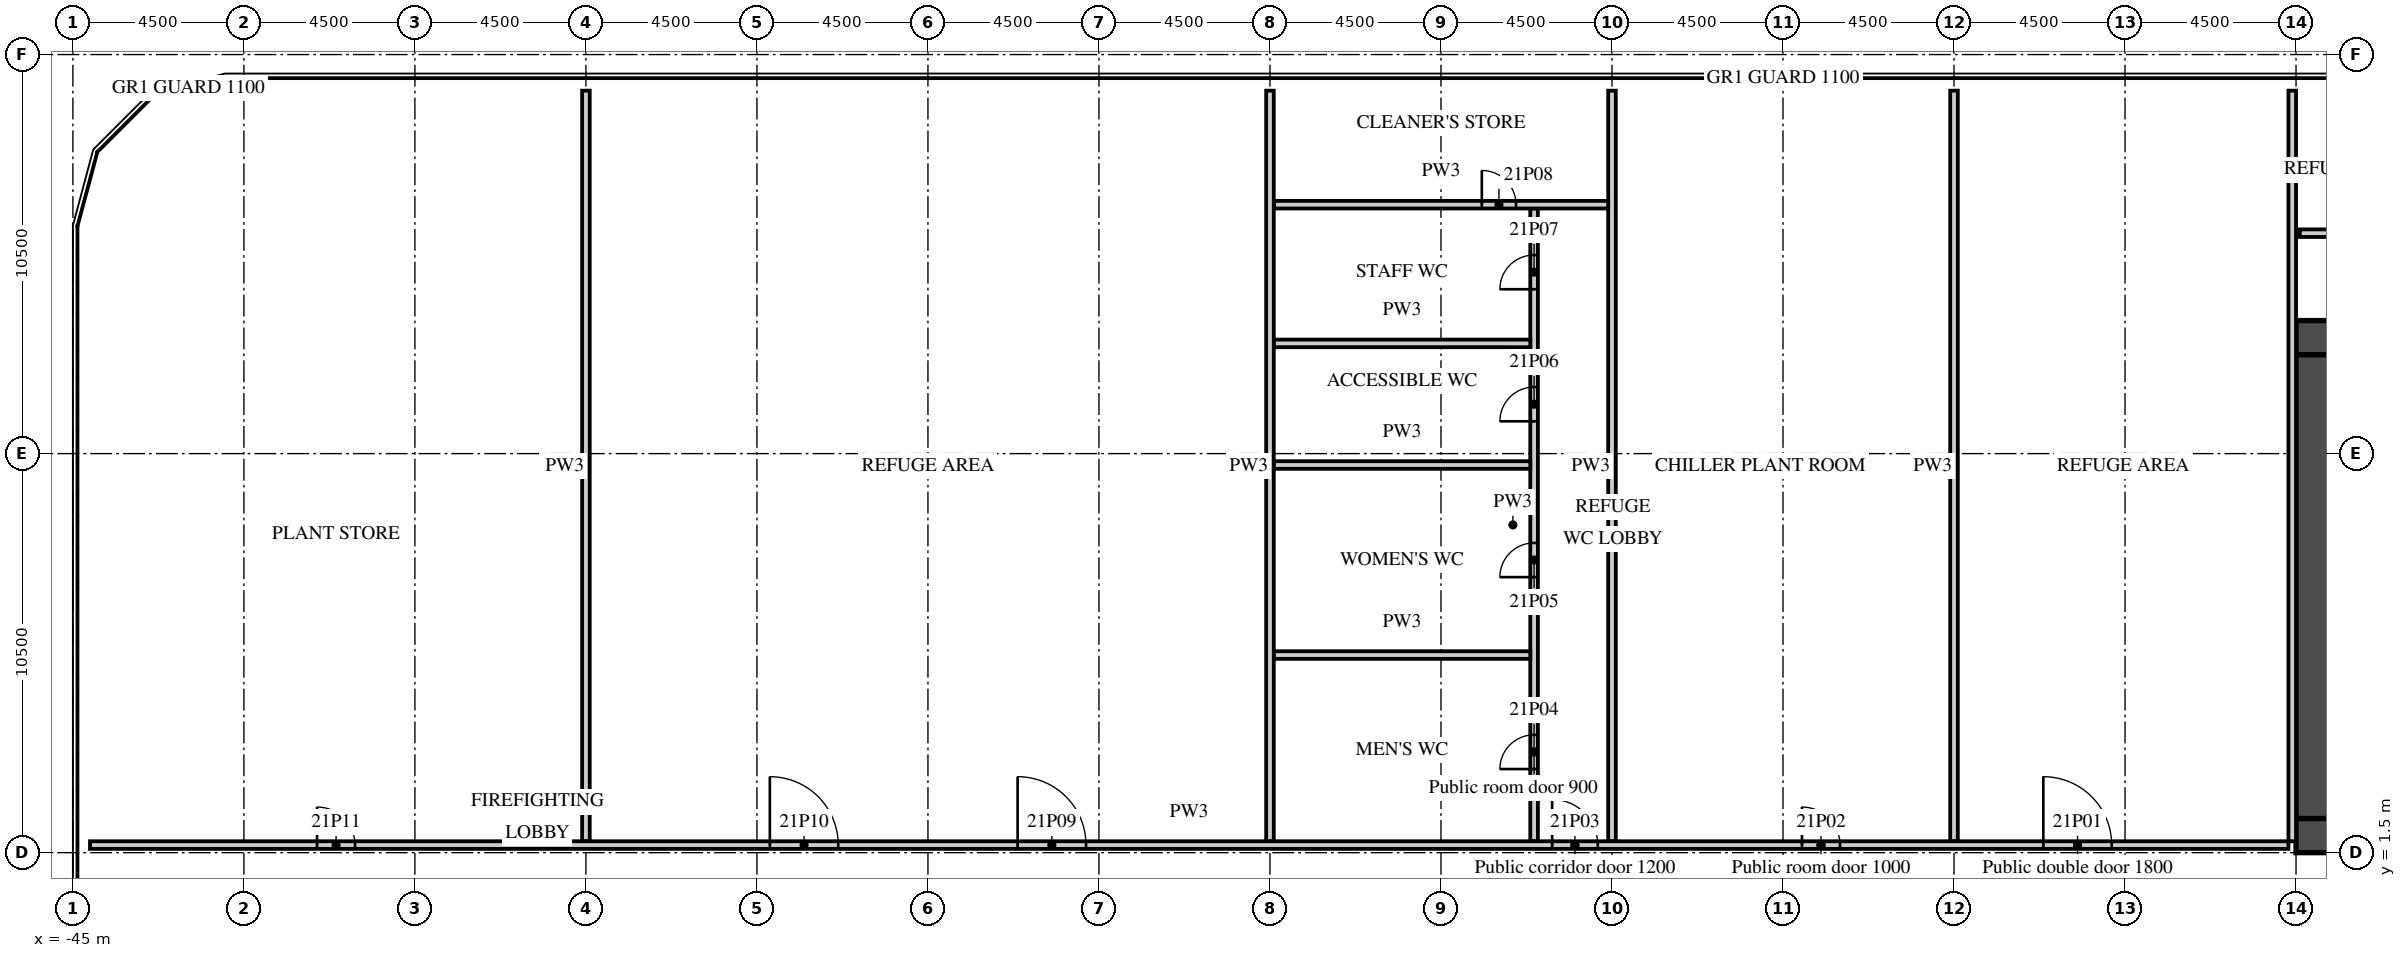
"""IFC4 building model, lengths in metres.
Left out: names, types, materials, properties, quantities, classifications, styles, units other than length and angle.
Written with IfcOpenShell. Run it as: python <this file> out.ifc"""

import sys

from ifc_helpers import new_model, si_unit, direction, frame, frame_2d, origin, place, context, subcontext, project, spatial, rectangle, extrude, element, fill, save


model = new_model("IFC4")
c1 = context("Model", 3, precision=1e-05, world=origin(), true_north=direction((0.0, 1.0)))
c2 = subcontext(c1, "Body", "Model", "MODEL_VIEW")
j1 = project(units=[si_unit("LENGTHUNIT", "METRE"), si_unit("PLANEANGLEUNIT", "RADIAN")], contexts=[c1])
p1 = place(None, origin())
s1 = spatial("IfcSite", under=j1, at=p1, CompositionType="ELEMENT")
p2 = place(p1, origin())
s2 = spatial("IfcBuilding", under=s1, at=p2, CompositionType="ELEMENT")
p3 = place(p2, frame((0.0, 0.0, 99.6)))
s3 = spatial("IfcBuildingStorey", under=s2, at=p3, CompositionType="ELEMENT", Elevation=99.6)
p4 = place(p3, frame((13.5, 1.95, 0.0), z_axis=(0.0, 0.0, 1.0), x_axis=(1.0, 0.0, 0.0)))
e1 = element("IfcWall", 1, at=p4, inside=s3, PredefinedType="SHEAR", context=c2, shape_type="SweptSolid", body=[
    extrude(rectangle(XDim=18.0, YDim=0.9, at=frame_2d((9.0, 0.0))), origin(), (0.0, 0.0, 1.0), 4.2),
])
p5 = place(p4, frame((1.475, 0.0, 0.0)))
e2 = element("IfcOpeningElement", 2, at=p5, cuts=e1, PredefinedType="OPENING", context=c2, shape_type="SweptSolid", body=[
    extrude(rectangle(XDim=1.8, YDim=2.1, at=frame_2d((0.9, 1.05))), frame((0.0, 0.46, 0.0), z_axis=(0.0, -1.0, 0.0), x_axis=(1.0, 0.0, 0.0)), (0.0, 0.0, 1.0), 0.92),
])
p6 = place(p3, frame((13.5, 15.05, 0.0), z_axis=(0.0, 0.0, 1.0), x_axis=(1.0, 0.0, 0.0)))
e3 = element("IfcWall", 3, at=p6, inside=s3, PredefinedType="SHEAR", context=c2, shape_type="SweptSolid", body=[
    extrude(rectangle(XDim=6.8, YDim=0.9, at=frame_2d((3.4, 0.0))), origin(), (0.0, 0.0, 1.0), 4.2),
])
p7 = place(p6, frame((4.725, 0.0, 0.0)))
e4 = element("IfcOpeningElement", 4, at=p7, cuts=e3, PredefinedType="OPENING", context=c2, shape_type="SweptSolid", body=[
    extrude(rectangle(XDim=1.2, YDim=2.1, at=frame_2d((0.6, 1.05))), frame((0.0, 0.46, 0.0), z_axis=(0.0, -1.0, 0.0), x_axis=(1.0, 0.0, 0.0)), (0.0, 0.0, 1.0), 0.92),
])
p8 = place(p3, frame((13.95, 2.4, 0.0), z_axis=(0.0, 0.0, 1.0), x_axis=(0.0, 1.0, 0.0)))
e5 = element("IfcWall", 5, at=p8, inside=s3, PredefinedType="SHEAR", context=c2, shape_type="SweptSolid", body=[
    extrude(rectangle(XDim=12.2, YDim=0.9, at=frame_2d((6.1, 0.0))), origin(), (0.0, 0.0, 1.0), 4.2),
])
p9 = place(p3, frame((13.6, 17.8, 0.0), z_axis=(0.0, 0.0, 1.0), x_axis=(1.0, 0.0, 0.0)))
e6 = element("IfcWall", 6, at=p9, inside=s3, PredefinedType="PARTITIONING", context=c2, shape_type="SweptSolid", body=[
    extrude(rectangle(XDim=30.95, YDim=0.2, at=frame_2d((15.475, 0.0))), origin(), (0.0, 0.0, 1.0), 4.2),
])
p10 = place(p9, frame((16.613, 0.0, 0.0)))
e7 = element("IfcOpeningElement", 7, at=p10, cuts=e6, PredefinedType="OPENING", context=c2, shape_type="SweptSolid", body=[
    extrude(rectangle(XDim=0.9, YDim=2.1, at=frame_2d((0.45, 1.05))), frame((0.0, 0.11, 0.0), z_axis=(0.0, -1.0, 0.0), x_axis=(1.0, 0.0, 0.0)), (0.0, 0.0, 1.0), 0.22),
])
p11 = place(p9, frame((8.312, 0.0, 0.0)))
e8 = element("IfcOpeningElement", 8, at=p11, cuts=e6, PredefinedType="OPENING", context=c2, shape_type="SweptSolid", body=[
    extrude(rectangle(XDim=0.9, YDim=2.1, at=frame_2d((0.45, 1.05))), frame((0.0, 0.11, 0.0), z_axis=(0.0, -1.0, 0.0), x_axis=(1.0, 0.0, 0.0)), (0.0, 0.0, 1.0), 0.22),
])
for number, where, z_axis, x_axis in (
    (9, (4.5, 1.8, 0.0), (0.0, 0.0, 1.0), (0.0, 1.0, 0.0)),
    (10, (-4.5, 1.8, 0.0), (0.0, 0.0, 1.0), (0.0, 1.0, 0.0)),
):
    element("IfcWall", number, at=place(p3, frame(where, z_axis=z_axis, x_axis=x_axis)), inside=s3, PredefinedType="PARTITIONING", context=c2, shape_type="SweptSolid", body=[
        extrude(rectangle(XDim=19.75, YDim=0.2, at=frame_2d((9.875, 0.0))), origin(), (0.0, 0.0, 1.0), 4.2),
    ])
p12 = place(p3, frame((-6.55, 1.8, 0.0), z_axis=(0.0, 0.0, 1.0), x_axis=(0.0, 1.0, 0.0)))
e11 = element("IfcWall", 11, at=p12, inside=s3, PredefinedType="PARTITIONING", context=c2, shape_type="SweptSolid", body=[
    extrude(rectangle(XDim=16.65, YDim=0.2, at=frame_2d((8.325, 0.0))), origin(), (0.0, 0.0, 1.0), 4.2),
])
p13 = place(p12, frame((1.9, 0.0, 0.0)))
e12 = element("IfcOpeningElement", 12, at=p13, cuts=e11, PredefinedType="OPENING", context=c2, shape_type="SweptSolid", body=[
    extrude(rectangle(XDim=0.9, YDim=2.1, at=frame_2d((0.45, 1.05))), frame((0.0, 0.11, 0.0), z_axis=(0.0, -1.0, 0.0), x_axis=(1.0, 0.0, 0.0)), (0.0, 0.0, 1.0), 0.22),
])
p14 = place(p12, frame((6.95, 0.0, 0.0)))
e13 = element("IfcOpeningElement", 13, at=p14, cuts=e11, PredefinedType="OPENING", context=c2, shape_type="SweptSolid", body=[
    extrude(rectangle(XDim=0.9, YDim=2.1, at=frame_2d((0.45, 1.05))), frame((0.0, 0.11, 0.0), z_axis=(0.0, -1.0, 0.0), x_axis=(1.0, 0.0, 0.0)), (0.0, 0.0, 1.0), 0.22),
])
p15 = place(p12, frame((11.05, 0.0, 0.0)))
e14 = element("IfcOpeningElement", 14, at=p15, cuts=e11, PredefinedType="OPENING", context=c2, shape_type="SweptSolid", body=[
    extrude(rectangle(XDim=0.9, YDim=2.1, at=frame_2d((0.45, 1.05))), frame((0.0, 0.11, 0.0), z_axis=(0.0, -1.0, 0.0), x_axis=(1.0, 0.0, 0.0)), (0.0, 0.0, 1.0), 0.22),
])
p16 = place(p12, frame((14.525, 0.0, 0.0)))
e15 = element("IfcOpeningElement", 15, at=p16, cuts=e11, PredefinedType="OPENING", context=c2, shape_type="SweptSolid", body=[
    extrude(rectangle(XDim=0.9, YDim=2.1, at=frame_2d((0.45, 1.05))), frame((0.0, 0.11, 0.0), z_axis=(0.0, -1.0, 0.0), x_axis=(1.0, 0.0, 0.0)), (0.0, 0.0, 1.0), 0.22),
])
for number, where, z_axis, x_axis in (
    (16, (-13.4, 6.7, 0.0), (0.0, 0.0, 1.0), (1.0, 0.0, 0.0)),
    (17, (-13.4, 11.7, 0.0), (0.0, 0.0, 1.0), (1.0, 0.0, 0.0)),
    (18, (-13.4, 14.9, 0.0), (0.0, 0.0, 1.0), (1.0, 0.0, 0.0)),
):
    element("IfcWall", number, at=place(p3, frame(where, z_axis=z_axis, x_axis=x_axis)), inside=s3, PredefinedType="PARTITIONING", context=c2, shape_type="SweptSolid", body=[
        extrude(rectangle(XDim=6.75, YDim=0.2, at=frame_2d((3.375, 0.0))), origin(), (0.0, 0.0, 1.0), 4.2),
    ])
p17 = place(p3, frame((-13.4, 18.55, 0.0), z_axis=(0.0, 0.0, 1.0), x_axis=(1.0, 0.0, 0.0)))
e19 = element("IfcWall", 19, at=p17, inside=s3, PredefinedType="PARTITIONING", context=c2, shape_type="SweptSolid", body=[
    extrude(rectangle(XDim=8.8, YDim=0.2, at=frame_2d((4.4, 0.0))), origin(), (0.0, 0.0, 1.0), 4.2),
])
p18 = place(p17, frame((5.475, 0.0, 0.0)))
e20 = element("IfcOpeningElement", 20, at=p18, cuts=e19, PredefinedType="OPENING", context=c2, shape_type="SweptSolid", body=[
    extrude(rectangle(XDim=0.9, YDim=2.1, at=frame_2d((0.45, 1.05))), frame((0.0, 0.11, 0.0), z_axis=(0.0, -1.0, 0.0), x_axis=(1.0, 0.0, 0.0)), (0.0, 0.0, 1.0), 0.22),
])
for number, where, z_axis, x_axis in (
    (21, (-13.5, 1.8, 0.0), (0.0, 0.0, 1.0), (0.0, 1.0, 0.0)),
    (22, (-31.5, 1.8, 0.0), (0.0, 0.0, 1.0), (0.0, 1.0, 0.0)),
):
    element("IfcWall", number, at=place(p3, frame(where, z_axis=z_axis, x_axis=x_axis)), inside=s3, PredefinedType="PARTITIONING", context=c2, shape_type="SweptSolid", body=[
        extrude(rectangle(XDim=19.75, YDim=0.2, at=frame_2d((9.875, 0.0))), origin(), (0.0, 0.0, 1.0), 4.2),
    ])
p19 = place(p3, frame((-44.55, 1.7, 0.0), z_axis=(0.0, 0.0, 1.0), x_axis=(1.0, 0.0, 0.0)))
e23 = element("IfcWall", 23, at=p19, inside=s3, PredefinedType="PARTITIONING", context=c2, shape_type="SweptSolid", body=[
    extrude(rectangle(XDim=57.85, YDim=0.2, at=frame_2d((28.925, 0.0))), origin(), (0.0, 0.0, 1.0), 4.2),
])
p20 = place(p19, frame((51.4, 0.0, 0.0)))
e24 = element("IfcOpeningElement", 24, at=p20, cuts=e23, PredefinedType="OPENING", context=c2, shape_type="SweptSolid", body=[
    extrude(rectangle(XDim=1.8, YDim=2.1, at=frame_2d((0.9, 1.05))), frame((0.0, 0.11, 0.0), z_axis=(0.0, -1.0, 0.0), x_axis=(1.0, 0.0, 0.0)), (0.0, 0.0, 1.0), 0.22),
])
p21 = place(p19, frame((45.05, 0.0, 0.0)))
e25 = element("IfcOpeningElement", 25, at=p21, cuts=e23, PredefinedType="OPENING", context=c2, shape_type="SweptSolid", body=[
    extrude(rectangle(XDim=1.0, YDim=2.1, at=frame_2d((0.5, 1.05))), frame((0.0, 0.11, 0.0), z_axis=(0.0, -1.0, 0.0), x_axis=(1.0, 0.0, 0.0)), (0.0, 0.0, 1.0), 0.22),
])
p22 = place(p19, frame((38.475, 0.0, 0.0)))
e26 = element("IfcOpeningElement", 26, at=p22, cuts=e23, PredefinedType="OPENING", context=c2, shape_type="SweptSolid", body=[
    extrude(rectangle(XDim=1.2, YDim=2.1, at=frame_2d((0.6, 1.05))), frame((0.0, 0.11, 0.0), z_axis=(0.0, -1.0, 0.0), x_axis=(1.0, 0.0, 0.0)), (0.0, 0.0, 1.0), 0.22),
])
p23 = place(p19, frame((24.41, 0.0, 0.0)))
e27 = element("IfcOpeningElement", 27, at=p23, cuts=e23, PredefinedType="OPENING", context=c2, shape_type="SweptSolid", body=[
    extrude(rectangle(XDim=1.8, YDim=2.1, at=frame_2d((0.9, 1.05))), frame((0.0, 0.11, 0.0), z_axis=(0.0, -1.0, 0.0), x_axis=(1.0, 0.0, 0.0)), (0.0, 0.0, 1.0), 0.22),
])
p24 = place(p19, frame((17.89, 0.0, 0.0)))
e28 = element("IfcOpeningElement", 28, at=p24, cuts=e23, PredefinedType="OPENING", context=c2, shape_type="SweptSolid", body=[
    extrude(rectangle(XDim=1.8, YDim=2.1, at=frame_2d((0.9, 1.05))), frame((0.0, 0.11, 0.0), z_axis=(0.0, -1.0, 0.0), x_axis=(1.0, 0.0, 0.0)), (0.0, 0.0, 1.0), 0.22),
])
p25 = place(p19, frame((5.975, 0.0, 0.0)))
e29 = element("IfcOpeningElement", 29, at=p25, cuts=e23, PredefinedType="OPENING", context=c2, shape_type="SweptSolid", body=[
    extrude(rectangle(XDim=1.0, YDim=2.1, at=frame_2d((0.5, 1.05))), frame((0.0, 0.11, 0.0), z_axis=(0.0, -1.0, 0.0), x_axis=(1.0, 0.0, 0.0)), (0.0, 0.0, 1.0), 0.22),
])
p26 = place(p3, frame((13.4, 1.8, 0.0), z_axis=(0.0, 0.0, 1.0), x_axis=(0.0, 1.0, 0.0)))
e30 = element("IfcWall", 30, at=p26, inside=s3, PredefinedType="PARTITIONING", context=c2, shape_type="SweptSolid", body=[
    extrude(rectangle(XDim=19.75, YDim=0.2, at=frame_2d((9.875, 0.0))), origin(), (0.0, 0.0, 1.0), 4.2),
])
p27 = place(p20, origin())
e31 = element("IfcDoor", 31, at=p27, inside=s3, OperationType="DOUBLE_DOOR_DOUBLE_SWING", PredefinedType="DOOR", context=c2, shape_type="SweptSolid", body=[
    extrude(rectangle(XDim=1.8, YDim=2.1, at=frame_2d((0.9, 1.05))), frame((0.0, 0.025, 0.0), z_axis=(0.0, -1.0, 0.0), x_axis=(1.0, 0.0, 0.0)), (0.0, 0.0, 1.0), 0.05),
])
fill(e24, e31)
p28 = place(p21, origin())
e32 = element("IfcDoor", 32, at=p28, inside=s3, OperationType="SINGLE_SWING_LEFT", PredefinedType="DOOR", context=c2, shape_type="SweptSolid", body=[
    extrude(rectangle(XDim=1.0, YDim=2.1, at=frame_2d((0.5, 1.05))), frame((0.0, 0.025, 0.0), z_axis=(0.0, -1.0, 0.0), x_axis=(1.0, 0.0, 0.0)), (0.0, 0.0, 1.0), 0.05),
])
fill(e25, e32)
p29 = place(p22, origin())
e33 = element("IfcDoor", 33, at=p29, inside=s3, OperationType="SINGLE_SWING_LEFT", PredefinedType="DOOR", context=c2, shape_type="SweptSolid", body=[
    extrude(rectangle(XDim=1.2, YDim=2.1, at=frame_2d((0.6, 1.05))), frame((0.0, 0.025, 0.0), z_axis=(0.0, -1.0, 0.0), x_axis=(1.0, 0.0, 0.0)), (0.0, 0.0, 1.0), 0.05),
])
fill(e26, e33)
p30 = place(p13, origin())
e34 = element("IfcDoor", 34, at=p30, inside=s3, OperationType="SINGLE_SWING_LEFT", PredefinedType="DOOR", context=c2, shape_type="SweptSolid", body=[
    extrude(rectangle(XDim=0.9, YDim=2.1, at=frame_2d((0.45, 1.05))), frame((0.0, 0.025, 0.0), z_axis=(0.0, -1.0, 0.0), x_axis=(1.0, 0.0, 0.0)), (0.0, 0.0, 1.0), 0.05),
])
fill(e12, e34)
p31 = place(p14, origin())
e35 = element("IfcDoor", 35, at=p31, inside=s3, OperationType="SINGLE_SWING_LEFT", PredefinedType="DOOR", context=c2, shape_type="SweptSolid", body=[
    extrude(rectangle(XDim=0.9, YDim=2.1, at=frame_2d((0.45, 1.05))), frame((0.0, 0.025, 0.0), z_axis=(0.0, -1.0, 0.0), x_axis=(1.0, 0.0, 0.0)), (0.0, 0.0, 1.0), 0.05),
])
fill(e13, e35)
p32 = place(p15, origin())
e36 = element("IfcDoor", 36, at=p32, inside=s3, OperationType="SINGLE_SWING_LEFT", PredefinedType="DOOR", context=c2, shape_type="SweptSolid", body=[
    extrude(rectangle(XDim=0.9, YDim=2.1, at=frame_2d((0.45, 1.05))), frame((0.0, 0.025, 0.0), z_axis=(0.0, -1.0, 0.0), x_axis=(1.0, 0.0, 0.0)), (0.0, 0.0, 1.0), 0.05),
])
fill(e14, e36)
p33 = place(p16, origin())
e37 = element("IfcDoor", 37, at=p33, inside=s3, OperationType="SINGLE_SWING_LEFT", PredefinedType="DOOR", context=c2, shape_type="SweptSolid", body=[
    extrude(rectangle(XDim=0.9, YDim=2.1, at=frame_2d((0.45, 1.05))), frame((0.0, 0.025, 0.0), z_axis=(0.0, -1.0, 0.0), x_axis=(1.0, 0.0, 0.0)), (0.0, 0.0, 1.0), 0.05),
])
fill(e15, e37)
p34 = place(p18, origin())
e38 = element("IfcDoor", 38, at=p34, inside=s3, OperationType="SINGLE_SWING_LEFT", PredefinedType="DOOR", context=c2, shape_type="SweptSolid", body=[
    extrude(rectangle(XDim=0.9, YDim=2.1, at=frame_2d((0.45, 1.05))), frame((0.0, 0.025, 0.0), z_axis=(0.0, -1.0, 0.0), x_axis=(1.0, 0.0, 0.0)), (0.0, 0.0, 1.0), 0.05),
])
fill(e20, e38)
p35 = place(p23, origin())
e39 = element("IfcDoor", 39, at=p35, inside=s3, OperationType="DOUBLE_DOOR_DOUBLE_SWING", PredefinedType="DOOR", context=c2, shape_type="SweptSolid", body=[
    extrude(rectangle(XDim=1.8, YDim=2.1, at=frame_2d((0.9, 1.05))), frame((0.0, 0.025, 0.0), z_axis=(0.0, -1.0, 0.0), x_axis=(1.0, 0.0, 0.0)), (0.0, 0.0, 1.0), 0.05),
])
fill(e27, e39)
p36 = place(p24, origin())
e40 = element("IfcDoor", 40, at=p36, inside=s3, OperationType="DOUBLE_DOOR_DOUBLE_SWING", PredefinedType="DOOR", context=c2, shape_type="SweptSolid", body=[
    extrude(rectangle(XDim=1.8, YDim=2.1, at=frame_2d((0.9, 1.05))), frame((0.0, 0.025, 0.0), z_axis=(0.0, -1.0, 0.0), x_axis=(1.0, 0.0, 0.0)), (0.0, 0.0, 1.0), 0.05),
])
fill(e28, e40)
p37 = place(p25, origin())
e41 = element("IfcDoor", 41, at=p37, inside=s3, OperationType="SINGLE_SWING_LEFT", PredefinedType="DOOR", context=c2, shape_type="SweptSolid", body=[
    extrude(rectangle(XDim=1.0, YDim=2.1, at=frame_2d((0.5, 1.05))), frame((0.0, 0.025, 0.0), z_axis=(0.0, -1.0, 0.0), x_axis=(1.0, 0.0, 0.0)), (0.0, 0.0, 1.0), 0.05),
])
fill(e29, e41)
save(model, sys.argv[1])
